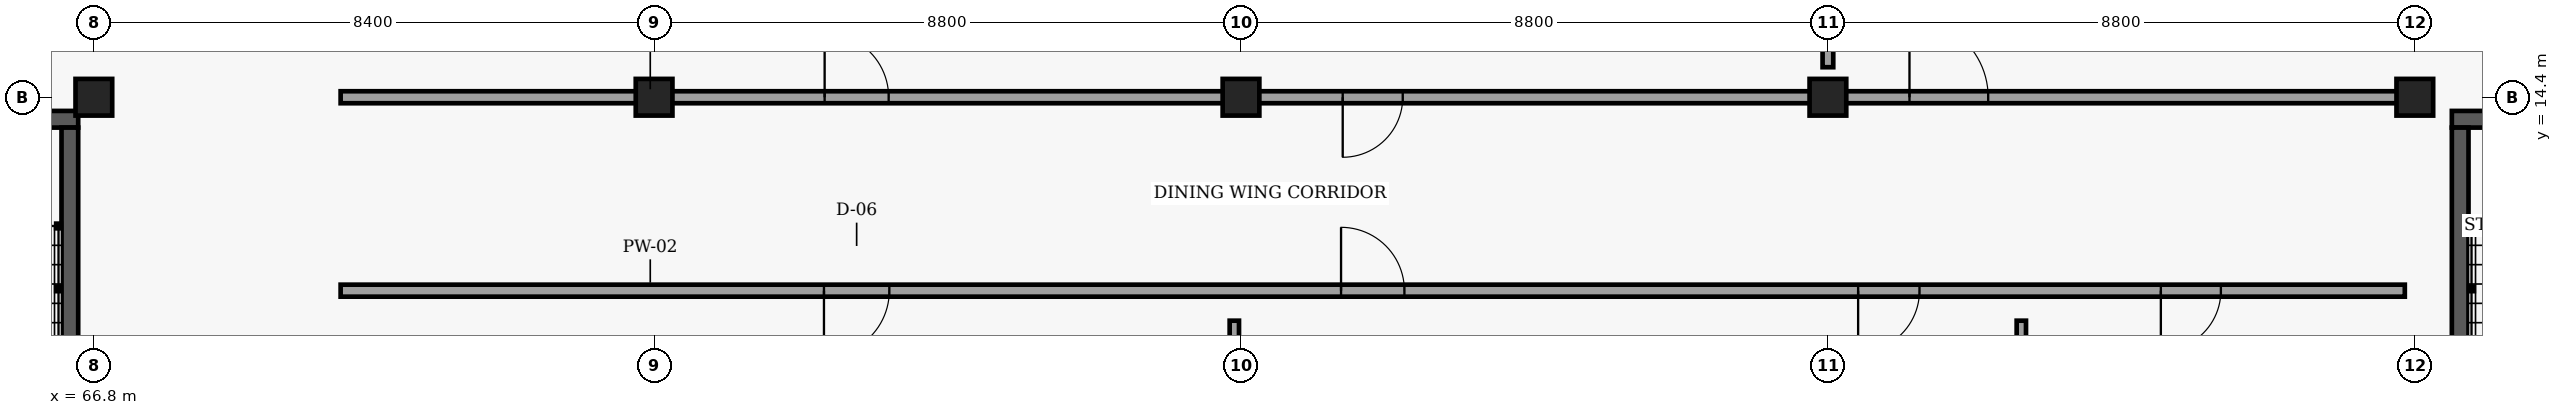
"""IFC4 building model, lengths in metres.
Left out: names, types, materials, properties, quantities, classifications, styles, units other than length and angle.
Written with IfcOpenShell. Run it as: python <this file> out.ifc"""

import sys

from ifc_helpers import new_model, si_unit, direction, frame, frame_2d, origin, origin_2d, place, context, subcontext, project, spatial, rectangle, extrude, element, fill, save


model = new_model("IFC4")
c1 = context("Model", 3, precision=1e-05, world=origin(), true_north=direction((0.0, 1.0)))
c2 = subcontext(c1, "Body", "Model", "MODEL_VIEW")
j1 = project(units=[si_unit("LENGTHUNIT", "METRE"), si_unit("PLANEANGLEUNIT", "RADIAN")], contexts=[c1])
p1 = place(None, origin())
s1 = spatial("IfcSite", under=j1, at=p1, CompositionType="ELEMENT")
p2 = place(p1, origin())
s2 = spatial("IfcBuilding", under=s1, at=p2, CompositionType="ELEMENT")
p3 = place(p2, origin())
s3 = spatial("IfcBuildingStorey", under=s2, at=p3, CompositionType="ELEMENT", Elevation=0.0)
for number, where, z_axis, x_axis in (
    (1, (66.8, 14.4, 0.0), (0.0, 0.0, 1.0), (1.0, 0.0, 0.0)),
    (2, (75.2, 14.4, 0.0), (0.0, 0.0, 1.0), (1.0, 0.0, 0.0)),
    (3, (84.0, 14.4, 0.0), (0.0, 0.0, 1.0), (1.0, 0.0, 0.0)),
    (4, (92.8, 14.4, 0.0), (0.0, 0.0, 1.0), (1.0, 0.0, 0.0)),
    (5, (101.6, 14.4, 0.0), (0.0, 0.0, 1.0), (1.0, 0.0, 0.0)),
):
    element("IfcColumn", number, at=place(p3, frame(where, z_axis=z_axis, x_axis=x_axis)), inside=s3, PredefinedType="COLUMN", context=c2, shape_type="SweptSolid", body=[
        extrude(rectangle(XDim=0.55, YDim=0.55, at=origin_2d()), origin(), (0.0, 0.0, 1.0), 4.8),
    ])
p4 = place(p3, frame((62.955, 14.07, 0.0), z_axis=(0.0, 0.0, 1.0), x_axis=(1.0, 0.0, 0.0)))
e6 = element("IfcWall", 6, at=p4, inside=s3, PredefinedType="SHEAR", context=c2, shape_type="SweptSolid", body=[
    extrude(rectangle(XDim=3.61, YDim=0.25, at=frame_2d((1.805, 0.0))), origin(), (0.0, 0.0, 1.0), 4.56),
])
p5 = place(p4, frame((1.205, 0.0, 0.0)))
e7 = element("IfcOpeningElement", 7, at=p5, cuts=e6, PredefinedType="OPENING", context=c2, shape_type="SweptSolid", body=[
    extrude(rectangle(XDim=1.2, YDim=2.15, at=frame_2d((0.6, 1.075))), frame((0.0, 0.135, 0.0), z_axis=(0.0, -1.0, 0.0), x_axis=(1.0, 0.0, 0.0)), (0.0, 0.0, 1.0), 0.27),
])
p6 = place(p3, frame((66.44, 13.945, 0.0), z_axis=(0.0, 0.0, 1.0), x_axis=(0.0, -1.0, 0.0)))
e8 = element("IfcWall", 8, at=p6, inside=s3, PredefinedType="SHEAR", context=c2, shape_type="SweptSolid", body=[
    extrude(rectangle(XDim=7.39, YDim=0.25, at=frame_2d((3.695, 0.0))), origin(), (0.0, 0.0, 1.0), 4.56),
])
p7 = place(p3, frame((102.155, 14.07, 0.0), z_axis=(0.0, 0.0, 1.0), x_axis=(1.0, 0.0, 0.0)))
e9 = element("IfcWall", 9, at=p7, inside=s3, PredefinedType="SHEAR", context=c2, shape_type="SweptSolid", body=[
    extrude(rectangle(XDim=3.61, YDim=0.25, at=frame_2d((1.805, 0.0))), origin(), (0.0, 0.0, 1.0), 4.56),
])
p8 = place(p7, frame((1.235, 0.0, 0.0)))
e10 = element("IfcOpeningElement", 10, at=p8, cuts=e9, PredefinedType="OPENING", context=c2, shape_type="SweptSolid", body=[
    extrude(rectangle(XDim=1.14, YDim=2.15, at=frame_2d((0.57, 1.075))), frame((0.0, 0.135, 0.0), z_axis=(0.0, -1.0, 0.0), x_axis=(1.0, 0.0, 0.0)), (0.0, 0.0, 1.0), 0.27),
])
p9 = place(p3, frame((102.28, 6.555, 0.0), z_axis=(0.0, 0.0, 1.0), x_axis=(0.0, 1.0, 0.0)))
e11 = element("IfcWall", 11, at=p9, inside=s3, PredefinedType="SHEAR", context=c2, shape_type="SweptSolid", body=[
    extrude(rectangle(XDim=7.39, YDim=0.25, at=frame_2d((3.695, 0.0))), origin(), (0.0, 0.0, 1.0), 4.56),
])
p10 = place(p3, frame((70.5, 11.5, 0.0), z_axis=(0.0, 0.0, 1.0), x_axis=(1.0, 0.0, 0.0)))
e12 = element("IfcWall", 12, at=p10, inside=s3, PredefinedType="PARTITIONING", context=c2, shape_type="SweptSolid", body=[
    extrude(rectangle(XDim=30.95, YDim=0.18, at=frame_2d((15.475, 0.0))), origin(), (0.0, 0.0, 1.0), 3.845),
])
p11 = place(p10, frame((7.247, 0.0, 0.0)))
e13 = element("IfcOpeningElement", 13, at=p11, cuts=e12, PredefinedType="OPENING", context=c2, shape_type="SweptSolid", body=[
    extrude(rectangle(XDim=0.98, YDim=2.12, at=frame_2d((0.49, 1.06))), frame((0.0, 0.1, 0.0), z_axis=(0.0, -1.0, 0.0), x_axis=(1.0, 0.0, 0.0)), (0.0, 0.0, 1.0), 0.2),
])
p12 = place(p10, frame((15.0, 0.0, 0.0)))
e14 = element("IfcOpeningElement", 14, at=p12, cuts=e12, PredefinedType="OPENING", context=c2, shape_type="SweptSolid", body=[
    extrude(rectangle(XDim=0.95, YDim=2.12, at=frame_2d((0.475, 1.06))), frame((0.0, 0.1, 0.0), z_axis=(0.0, -1.0, 0.0), x_axis=(1.0, 0.0, 0.0)), (0.0, 0.0, 1.0), 0.2),
])
p13 = place(p10, frame((22.753, 0.0, 0.0)))
e15 = element("IfcOpeningElement", 15, at=p13, cuts=e12, PredefinedType="OPENING", context=c2, shape_type="SweptSolid", body=[
    extrude(rectangle(XDim=0.92, YDim=2.1, at=frame_2d((0.46, 1.05))), frame((0.0, 0.1, 0.0), z_axis=(0.0, -1.0, 0.0), x_axis=(1.0, 0.0, 0.0)), (0.0, 0.0, 1.0), 0.2),
])
p14 = place(p10, frame((27.292, 0.0, 0.0)))
e16 = element("IfcOpeningElement", 16, at=p14, cuts=e12, PredefinedType="OPENING", context=c2, shape_type="SweptSolid", body=[
    extrude(rectangle(XDim=0.9, YDim=2.06, at=frame_2d((0.45, 1.03))), frame((0.0, 0.1, 0.0), z_axis=(0.0, -1.0, 0.0), x_axis=(1.0, 0.0, 0.0)), (0.0, 0.0, 1.0), 0.2),
])
p15 = place(p3, frame((70.5, 14.4, 0.0), z_axis=(0.0, 0.0, 1.0), x_axis=(1.0, 0.0, 0.0)))
e17 = element("IfcWall", 17, at=p15, inside=s3, PredefinedType="PARTITIONING", context=c2, shape_type="SweptSolid", body=[
    extrude(rectangle(XDim=30.95, YDim=0.18, at=frame_2d((15.475, 0.0))), origin(), (0.0, 0.0, 1.0), 3.795),
])
p16 = place(p15, frame((7.257, 0.0, 0.0)))
e18 = element("IfcOpeningElement", 18, at=p16, cuts=e17, PredefinedType="OPENING", context=c2, shape_type="SweptSolid", body=[
    extrude(rectangle(XDim=0.96, YDim=2.08, at=frame_2d((0.48, 1.04))), frame((0.0, 0.1, 0.0), z_axis=(0.0, -1.0, 0.0), x_axis=(1.0, 0.0, 0.0)), (0.0, 0.0, 1.0), 0.2),
])
p17 = place(p15, frame((15.025, 0.0, 0.0)))
e19 = element("IfcOpeningElement", 19, at=p17, cuts=e17, PredefinedType="OPENING", context=c2, shape_type="SweptSolid", body=[
    extrude(rectangle(XDim=0.9, YDim=2.06, at=frame_2d((0.45, 1.03))), frame((0.0, 0.1, 0.0), z_axis=(0.0, -1.0, 0.0), x_axis=(1.0, 0.0, 0.0)), (0.0, 0.0, 1.0), 0.2),
])
p18 = place(p15, frame((23.523, 0.0, 0.0)))
e20 = element("IfcOpeningElement", 20, at=p18, cuts=e17, PredefinedType="OPENING", context=c2, shape_type="SweptSolid", body=[
    extrude(rectangle(XDim=1.18, YDim=2.18, at=frame_2d((0.59, 1.09))), frame((0.0, 0.1, 0.0), z_axis=(0.0, -1.0, 0.0), x_axis=(1.0, 0.0, 0.0)), (0.0, 0.0, 1.0), 0.2),
])
p19 = place(p3, frame((83.9, 6.55, 0.0), z_axis=(0.0, 0.0, 1.0), x_axis=(0.0, 1.0, 0.0)))
e21 = element("IfcWall", 21, at=p19, inside=s3, PredefinedType="PARTITIONING", context=c2, shape_type="SweptSolid", body=[
    extrude(rectangle(XDim=4.5, YDim=0.14, at=frame_2d((2.25, 0.0))), origin(), (0.0, 0.0, 1.0), 3.845),
])
p20 = place(p19, frame((1.6, 0.0, 0.0)))
e22 = element("IfcOpeningElement", 22, at=p20, cuts=e21, PredefinedType="OPENING", context=c2, shape_type="SweptSolid", body=[
    extrude(rectangle(XDim=1.3, YDim=2.2, at=frame_2d((0.65, 1.1))), frame((0.0, 0.08, 0.0), z_axis=(0.0, -1.0, 0.0), x_axis=(1.0, 0.0, 0.0)), (0.0, 0.0, 1.0), 0.16),
])
p21 = place(p3, frame((95.7, 6.55, 0.0), z_axis=(0.0, 0.0, 1.0), x_axis=(0.0, 1.0, 0.0)))
e23 = element("IfcWall", 23, at=p21, inside=s3, PredefinedType="PARTITIONING", context=c2, shape_type="SweptSolid", body=[
    extrude(rectangle(XDim=4.5, YDim=0.14, at=frame_2d((2.25, 0.0))), origin(), (0.0, 0.0, 1.0), 4.025),
])
p22 = place(p21, frame((1.5, 0.0, 0.0)))
e24 = element("IfcOpeningElement", 24, at=p22, cuts=e23, PredefinedType="OPENING", context=c2, shape_type="SweptSolid", body=[
    extrude(rectangle(XDim=1.5, YDim=2.25, at=frame_2d((0.75, 1.125))), frame((0.0, 0.08, 0.0), z_axis=(0.0, -1.0, 0.0), x_axis=(1.0, 0.0, 0.0)), (0.0, 0.0, 1.0), 0.16),
])
p23 = place(p3, frame((92.8, 14.85, 0.0), z_axis=(0.0, 0.0, 1.0), x_axis=(0.0, 1.0, 0.0)))
e25 = element("IfcWall", 25, at=p23, inside=s3, PredefinedType="PARTITIONING", context=c2, shape_type="SweptSolid", body=[
    extrude(rectangle(XDim=7.2, YDim=0.16, at=frame_2d((3.6, 0.0))), origin(), (0.0, 0.0, 1.0), 3.845),
])
p24 = place(p23, frame((2.98, 0.0, 0.0)))
e26 = element("IfcOpeningElement", 26, at=p24, cuts=e25, PredefinedType="OPENING", context=c2, shape_type="SweptSolid", body=[
    extrude(rectangle(XDim=1.24, YDim=2.2, at=frame_2d((0.62, 1.1))), frame((0.0, 0.09, 0.0), z_axis=(0.0, -1.0, 0.0), x_axis=(1.0, 0.0, 0.0)), (0.0, 0.0, 1.0), 0.18),
])
p25 = place(p11, origin())
e27 = element("IfcDoor", 27, at=p25, inside=s3, OperationType="SINGLE_SWING_RIGHT", PredefinedType="DOOR", context=c2, shape_type="SweptSolid", body=[
    extrude(rectangle(XDim=0.98, YDim=2.12, at=frame_2d((0.49, 1.06))), frame((0.0, 0.025, 0.0), z_axis=(0.0, -1.0, 0.0), x_axis=(1.0, 0.0, 0.0)), (0.0, 0.0, 1.0), 0.05),
])
fill(e13, e27)
p26 = place(p12, origin())
e28 = element("IfcDoor", 28, at=p26, inside=s3, OperationType="SINGLE_SWING_LEFT", PredefinedType="DOOR", context=c2, shape_type="SweptSolid", body=[
    extrude(rectangle(XDim=0.95, YDim=2.12, at=frame_2d((0.475, 1.06))), frame((0.0, 0.025, 0.0), z_axis=(0.0, -1.0, 0.0), x_axis=(1.0, 0.0, 0.0)), (0.0, 0.0, 1.0), 0.05),
])
fill(e14, e28)
p27 = place(p13, origin())
e29 = element("IfcDoor", 29, at=p27, inside=s3, OperationType="SINGLE_SWING_RIGHT", PredefinedType="DOOR", context=c2, shape_type="SweptSolid", body=[
    extrude(rectangle(XDim=0.92, YDim=2.1, at=frame_2d((0.46, 1.05))), frame((0.0, 0.025, 0.0), z_axis=(0.0, -1.0, 0.0), x_axis=(1.0, 0.0, 0.0)), (0.0, 0.0, 1.0), 0.05),
])
fill(e15, e29)
p28 = place(p16, origin())
e30 = element("IfcDoor", 30, at=p28, inside=s3, OperationType="SINGLE_SWING_LEFT", PredefinedType="DOOR", context=c2, shape_type="SweptSolid", body=[
    extrude(rectangle(XDim=0.96, YDim=2.08, at=frame_2d((0.48, 1.04))), frame((0.0, 0.025, 0.0), z_axis=(0.0, -1.0, 0.0), x_axis=(1.0, 0.0, 0.0)), (0.0, 0.0, 1.0), 0.05),
])
fill(e18, e30)
p29 = place(p17, origin())
e31 = element("IfcDoor", 31, at=p29, inside=s3, OperationType="SINGLE_SWING_RIGHT", PredefinedType="DOOR", context=c2, shape_type="SweptSolid", body=[
    extrude(rectangle(XDim=0.9, YDim=2.06, at=frame_2d((0.45, 1.03))), frame((0.0, 0.025, 0.0), z_axis=(0.0, -1.0, 0.0), x_axis=(1.0, 0.0, 0.0)), (0.0, 0.0, 1.0), 0.05),
])
fill(e19, e31)
p30 = place(p18, origin())
e32 = element("IfcDoor", 32, at=p30, inside=s3, OperationType="SINGLE_SWING_LEFT", PredefinedType="DOOR", context=c2, shape_type="SweptSolid", body=[
    extrude(rectangle(XDim=1.18, YDim=2.18, at=frame_2d((0.59, 1.09))), frame((0.0, 0.025, 0.0), z_axis=(0.0, -1.0, 0.0), x_axis=(1.0, 0.0, 0.0)), (0.0, 0.0, 1.0), 0.05),
])
fill(e20, e32)
p31 = place(p14, origin())
e33 = element("IfcDoor", 33, at=p31, inside=s3, OperationType="SINGLE_SWING_RIGHT", PredefinedType="DOOR", context=c2, shape_type="SweptSolid", body=[
    extrude(rectangle(XDim=0.9, YDim=2.06, at=frame_2d((0.45, 1.03))), frame((0.0, 0.025, 0.0), z_axis=(0.0, -1.0, 0.0), x_axis=(1.0, 0.0, 0.0)), (0.0, 0.0, 1.0), 0.05),
])
fill(e16, e33)
save(model, sys.argv[1])
